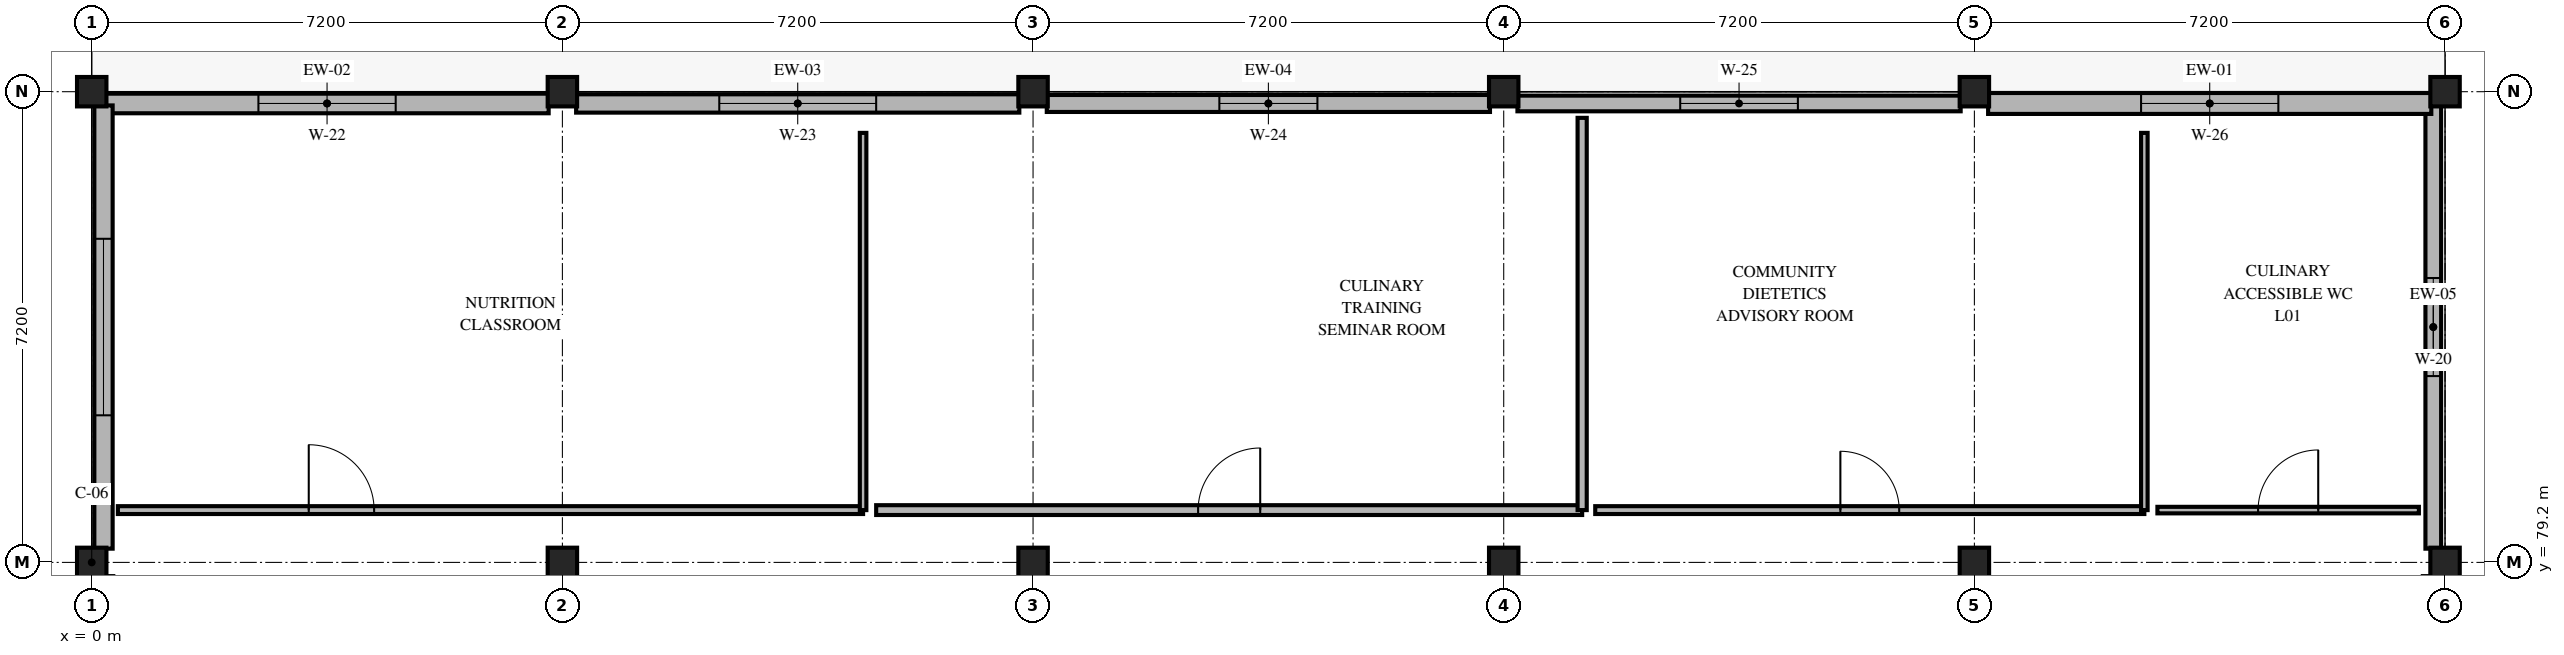
"""IFC4 building model, lengths in metres.
Left out: names, types, materials, properties, quantities, classifications, styles, units other than length and angle.
Written with IfcOpenShell. Run it as: python <this file> out.ifc"""

import sys

from ifc_helpers import new_model, si_unit, direction, frame, frame_2d, origin, origin_2d, place, context, subcontext, project, spatial, rectangle, extrude, element, fill, save


model = new_model("IFC4")
c1 = context("Model", 3, precision=1e-05, world=origin(), true_north=direction((0.0, 1.0)))
c2 = subcontext(c1, "Body", "Model", "MODEL_VIEW")
j1 = project(units=[si_unit("LENGTHUNIT", "METRE"), si_unit("PLANEANGLEUNIT", "RADIAN")], contexts=[c1])
p1 = place(None, origin())
s1 = spatial("IfcSite", under=j1, at=p1, CompositionType="ELEMENT")
p2 = place(p1, origin())
s2 = spatial("IfcBuilding", under=s1, at=p2, CompositionType="ELEMENT")
p3 = place(p2, frame((0.0, 0.0, 4.5)))
s3 = spatial("IfcBuildingStorey", under=s2, at=p3, CompositionType="ELEMENT", Elevation=4.5)
for number, where, z_axis, x_axis in (
    (1, (0.0, 79.2, 0.0), (0.0, 0.0, 1.0), (1.0, 0.0, 0.0)),
    (2, (0.0, 86.4, 0.0), (0.0, 0.0, 1.0), (1.0, 0.0, 0.0)),
    (3, (7.2, 79.2, 0.0), (0.0, 0.0, 1.0), (1.0, 0.0, 0.0)),
    (4, (7.2, 86.4, 0.0), (0.0, 0.0, 1.0), (1.0, 0.0, 0.0)),
    (5, (14.4, 79.2, 0.0), (0.0, 0.0, 1.0), (1.0, 0.0, 0.0)),
    (6, (14.4, 86.4, 0.0), (0.0, 0.0, 1.0), (1.0, 0.0, 0.0)),
    (7, (21.6, 79.2, 0.0), (0.0, 0.0, 1.0), (1.0, 0.0, 0.0)),
    (8, (21.6, 86.4, 0.0), (0.0, 0.0, 1.0), (1.0, 0.0, 0.0)),
    (9, (28.8, 79.2, 0.0), (0.0, 0.0, 1.0), (1.0, 0.0, 0.0)),
    (10, (28.8, 86.4, 0.0), (0.0, 0.0, 1.0), (1.0, 0.0, 0.0)),
    (11, (36.0, 79.2, 0.0), (0.0, 0.0, 1.0), (1.0, 0.0, 0.0)),
    (12, (36.0, 86.4, 0.0), (0.0, 0.0, 1.0), (1.0, 0.0, 0.0)),
):
    element("IfcColumn", number, at=place(p3, frame(where, z_axis=z_axis, x_axis=x_axis)), inside=s3, PredefinedType="COLUMN", context=c2, shape_type="SweptSolid", body=[
        extrude(rectangle(XDim=0.45, YDim=0.45, at=origin_2d()), origin(), (0.0, 0.0, 1.0), 4.2),
    ])
p4 = place(p3, frame((35.82, 86.19, 0.0), z_axis=(0.0, 0.0, 1.0), x_axis=(0.0, -1.0, 0.0)))
e13 = element("IfcWall", 13, at=p4, inside=s3, PredefinedType="SOLIDWALL", context=c2, shape_type="SweptSolid", body=[
    extrude(rectangle(XDim=6.78, YDim=0.24, at=frame_2d((3.39, 0.0))), origin(), (0.0, 0.0, 1.0), 3.15),
])
p5 = place(p4, frame((2.64, 0.0, 0.75)))
e14 = element("IfcOpeningElement", 14, at=p5, cuts=e13, PredefinedType="OPENING", context=c2, shape_type="SweptSolid", body=[
    extrude(rectangle(XDim=1.5, YDim=1.65, at=frame_2d((0.75, 0.825))), frame((0.0, 0.13, 0.0), z_axis=(0.0, -1.0, 0.0), x_axis=(1.0, 0.0, 0.0)), (0.0, 0.0, 1.0), 0.26),
])
p6 = place(p3, frame((0.21, 86.22, 0.0), z_axis=(0.0, 0.0, 1.0), x_axis=(1.0, 0.0, 0.0)))
e15 = element("IfcWall", 15, at=p6, inside=s3, PredefinedType="SOLIDWALL", context=c2, shape_type="SweptSolid", body=[
    extrude(rectangle(XDim=6.78, YDim=0.3, at=frame_2d((3.39, 0.0))), origin(), (0.0, 0.0, 1.0), 3.15),
])
p7 = place(p6, frame((2.34, 0.0, 0.75)))
e16 = element("IfcOpeningElement", 16, at=p7, cuts=e15, PredefinedType="OPENING", context=c2, shape_type="SweptSolid", body=[
    extrude(rectangle(XDim=2.1, YDim=1.65, at=frame_2d((1.05, 0.825))), frame((0.0, 0.16, 0.0), z_axis=(0.0, -1.0, 0.0), x_axis=(1.0, 0.0, 0.0)), (0.0, 0.0, 1.0), 0.32),
])
p8 = place(p3, frame((7.41, 86.22, 0.0), z_axis=(0.0, 0.0, 1.0), x_axis=(1.0, 0.0, 0.0)))
e17 = element("IfcWall", 17, at=p8, inside=s3, PredefinedType="SOLIDWALL", context=c2, shape_type="SweptSolid", body=[
    extrude(rectangle(XDim=6.78, YDim=0.28, at=frame_2d((3.39, 0.0))), origin(), (0.0, 0.0, 1.0), 3.15),
])
p9 = place(p8, frame((2.19, 0.0, 0.75)))
e18 = element("IfcOpeningElement", 18, at=p9, cuts=e17, PredefinedType="OPENING", context=c2, shape_type="SweptSolid", body=[
    extrude(rectangle(XDim=2.4, YDim=1.65, at=frame_2d((1.2, 0.825))), frame((0.0, 0.15, 0.0), z_axis=(0.0, -1.0, 0.0), x_axis=(1.0, 0.0, 0.0)), (0.0, 0.0, 1.0), 0.3),
])
p10 = place(p3, frame((14.61, 86.22, 0.0), z_axis=(0.0, 0.0, 1.0), x_axis=(1.0, 0.0, 0.0)))
e19 = element("IfcWall", 19, at=p10, inside=s3, PredefinedType="SOLIDWALL", context=c2, shape_type="SweptSolid", body=[
    extrude(rectangle(XDim=6.78, YDim=0.26, at=frame_2d((3.39, 0.0))), origin(), (0.0, 0.0, 1.0), 3.2),
])
p11 = place(p10, frame((2.64, 0.0, 0.9)))
e20 = element("IfcOpeningElement", 20, at=p11, cuts=e19, PredefinedType="OPENING", context=c2, shape_type="SweptSolid", body=[
    extrude(rectangle(XDim=1.5, YDim=0.75, at=frame_2d((0.75, 0.375))), frame((0.0, 0.14, 0.0), z_axis=(0.0, -1.0, 0.0), x_axis=(1.0, 0.0, 0.0)), (0.0, 0.0, 1.0), 0.28),
])
p12 = place(p3, frame((21.81, 86.22, 0.0), z_axis=(0.0, 0.0, 1.0), x_axis=(1.0, 0.0, 0.0)))
e21 = element("IfcWall", 21, at=p12, inside=s3, PredefinedType="SOLIDWALL", context=c2, shape_type="SweptSolid", body=[
    extrude(rectangle(XDim=6.78, YDim=0.24, at=frame_2d((3.39, 0.0))), origin(), (0.0, 0.0, 1.0), 3.2),
])
p13 = place(p12, frame((2.49, 0.0, 0.9)))
e22 = element("IfcOpeningElement", 22, at=p13, cuts=e21, PredefinedType="OPENING", context=c2, shape_type="SweptSolid", body=[
    extrude(rectangle(XDim=1.8, YDim=0.75, at=frame_2d((0.9, 0.375))), frame((0.0, 0.13, 0.0), z_axis=(0.0, -1.0, 0.0), x_axis=(1.0, 0.0, 0.0)), (0.0, 0.0, 1.0), 0.26),
])
p14 = place(p3, frame((29.01, 86.22, 0.0), z_axis=(0.0, 0.0, 1.0), x_axis=(1.0, 0.0, 0.0)))
e23 = element("IfcWall", 23, at=p14, inside=s3, PredefinedType="SOLIDWALL", context=c2, shape_type="SweptSolid", body=[
    extrude(rectangle(XDim=6.78, YDim=0.32, at=frame_2d((3.39, 0.0))), origin(), (0.0, 0.0, 1.0), 3.15),
])
p15 = place(p14, frame((2.34, 0.0, 0.9)))
e24 = element("IfcOpeningElement", 24, at=p15, cuts=e23, PredefinedType="OPENING", context=c2, shape_type="SweptSolid", body=[
    extrude(rectangle(XDim=2.1, YDim=0.75, at=frame_2d((1.05, 0.375))), frame((0.0, 0.17, 0.0), z_axis=(0.0, -1.0, 0.0), x_axis=(1.0, 0.0, 0.0)), (0.0, 0.0, 1.0), 0.34),
])
p16 = place(p3, frame((0.18, 79.41, 0.0), z_axis=(0.0, 0.0, 1.0), x_axis=(0.0, 1.0, 0.0)))
e25 = element("IfcWall", 25, at=p16, inside=s3, PredefinedType="SOLIDWALL", context=c2, shape_type="SweptSolid", body=[
    extrude(rectangle(XDim=6.78, YDim=0.28, at=frame_2d((3.39, 0.0))), origin(), (0.0, 0.0, 1.0), 3.15),
])
p17 = place(p16, frame((2.04, 0.0, 0.9)))
e26 = element("IfcOpeningElement", 26, at=p17, cuts=e25, PredefinedType="OPENING", context=c2, shape_type="SweptSolid", body=[
    extrude(rectangle(XDim=2.7, YDim=0.75, at=frame_2d((1.35, 0.375))), frame((0.0, 0.15, 0.0), z_axis=(0.0, -1.0, 0.0), x_axis=(1.0, 0.0, 0.0)), (0.0, 0.0, 1.0), 0.3),
])
p18 = place(p3, frame((0.4, 80.0, 0.0), z_axis=(0.0, 0.0, 1.0), x_axis=(1.0, 0.0, 0.0)))
e27 = element("IfcWall", 27, at=p18, inside=s3, PredefinedType="PARTITIONING", context=c2, shape_type="SweptSolid", body=[
    extrude(rectangle(XDim=11.4, YDim=0.12, at=frame_2d((5.7, 0.0))), origin(), (0.0, 0.0, 1.0), 3.25),
])
p19 = place(p18, frame((2.92, 0.0, 0.0)))
e28 = element("IfcOpeningElement", 28, at=p19, cuts=e27, PredefinedType="OPENING", context=c2, shape_type="SweptSolid", body=[
    extrude(rectangle(XDim=1.0, YDim=2.15, at=frame_2d((0.5, 1.075))), frame((0.0, 0.07, 0.0), z_axis=(0.0, -1.0, 0.0), x_axis=(1.0, 0.0, 0.0)), (0.0, 0.0, 1.0), 0.14),
])
p20 = place(p3, frame((11.8, 80.0, 0.0), z_axis=(0.0, 0.0, 1.0), x_axis=(0.0, 1.0, 0.0)))
e29 = element("IfcWall", 29, at=p20, inside=s3, PredefinedType="PARTITIONING", context=c2, shape_type="SweptSolid", body=[
    extrude(rectangle(XDim=5.77, YDim=0.1, at=frame_2d((2.885, 0.0))), origin(), (0.0, 0.0, 1.0), 3.39),
])
p21 = place(p3, frame((12.0, 80.0, 0.0), z_axis=(0.0, 0.0, 1.0), x_axis=(1.0, 0.0, 0.0)))
e30 = element("IfcWall", 30, at=p21, inside=s3, PredefinedType="PARTITIONING", context=c2, shape_type="SweptSolid", body=[
    extrude(rectangle(XDim=10.8, YDim=0.15, at=frame_2d((5.4, 0.0))), origin(), (0.0, 0.0, 1.0), 3.2),
])
p22 = place(p21, frame((4.925, 0.0, 0.0)))
e31 = element("IfcOpeningElement", 31, at=p22, cuts=e30, PredefinedType="OPENING", context=c2, shape_type="SweptSolid", body=[
    extrude(rectangle(XDim=0.95, YDim=2.15, at=frame_2d((0.475, 1.075))), frame((0.0, 0.085, 0.0), z_axis=(0.0, -1.0, 0.0), x_axis=(1.0, 0.0, 0.0)), (0.0, 0.0, 1.0), 0.17),
])
p23 = place(p3, frame((22.8, 80.0, 0.0), z_axis=(0.0, 0.0, 1.0), x_axis=(0.0, 1.0, 0.0)))
e32 = element("IfcWall", 32, at=p23, inside=s3, PredefinedType="PARTITIONING", context=c2, shape_type="SweptSolid", body=[
    extrude(rectangle(XDim=6.0, YDim=0.14, at=frame_2d((3.0, 0.0))), origin(), (0.0, 0.0, 1.0), 3.43),
])
p24 = place(p3, frame((23.0, 80.0, 0.0), z_axis=(0.0, 0.0, 1.0), x_axis=(1.0, 0.0, 0.0)))
e33 = element("IfcWall", 33, at=p24, inside=s3, PredefinedType="PARTITIONING", context=c2, shape_type="SweptSolid", body=[
    extrude(rectangle(XDim=8.4, YDim=0.12, at=frame_2d((4.2, 0.0))), origin(), (0.0, 0.0, 1.0), 3.3),
])
p25 = place(p24, frame((3.75, 0.0, 0.0)))
e34 = element("IfcOpeningElement", 34, at=p25, cuts=e33, PredefinedType="OPENING", context=c2, shape_type="SweptSolid", body=[
    extrude(rectangle(XDim=0.9, YDim=2.1, at=frame_2d((0.45, 1.05))), frame((0.0, 0.07, 0.0), z_axis=(0.0, -1.0, 0.0), x_axis=(1.0, 0.0, 0.0)), (0.0, 0.0, 1.0), 0.14),
])
p26 = place(p3, frame((31.4, 80.0, 0.0), z_axis=(0.0, 0.0, 1.0), x_axis=(0.0, 1.0, 0.0)))
e35 = element("IfcWall", 35, at=p26, inside=s3, PredefinedType="PARTITIONING", context=c2, shape_type="SweptSolid", body=[
    extrude(rectangle(XDim=5.77, YDim=0.1, at=frame_2d((2.885, 0.0))), origin(), (0.0, 0.0, 1.0), 3.33),
])
p27 = place(p3, frame((31.6, 80.0, 0.0), z_axis=(0.0, 0.0, 1.0), x_axis=(1.0, 0.0, 0.0)))
e36 = element("IfcWall", 36, at=p27, inside=s3, PredefinedType="PARTITIONING", context=c2, shape_type="SweptSolid", body=[
    extrude(rectangle(XDim=4.0, YDim=0.1, at=frame_2d((2.0, 0.0))), origin(), (0.0, 0.0, 1.0), 3.95),
])
p28 = place(p27, frame((1.54, 0.0, 0.0)))
e37 = element("IfcOpeningElement", 37, at=p28, cuts=e36, PredefinedType="OPENING", context=c2, shape_type="SweptSolid", body=[
    extrude(rectangle(XDim=0.92, YDim=2.1, at=frame_2d((0.46, 1.05))), frame((0.0, 0.06, 0.0), z_axis=(0.0, -1.0, 0.0), x_axis=(1.0, 0.0, 0.0)), (0.0, 0.0, 1.0), 0.12),
])
p29 = place(p5, origin())
e38 = element("IfcWindow", 38, at=p29, inside=s3, PartitioningType="SINGLE_PANEL", PredefinedType="WINDOW", context=c2, shape_type="SweptSolid", body=[
    extrude(rectangle(XDim=1.5, YDim=1.65, at=frame_2d((0.75, 0.825))), frame((0.0, 0.03, 0.0), z_axis=(0.0, -1.0, 0.0), x_axis=(1.0, 0.0, 0.0)), (0.0, 0.0, 1.0), 0.06),
])
fill(e14, e38)
p30 = place(p7, origin())
e39 = element("IfcWindow", 39, at=p30, inside=s3, PartitioningType="SINGLE_PANEL", PredefinedType="WINDOW", context=c2, shape_type="SweptSolid", body=[
    extrude(rectangle(XDim=2.1, YDim=1.65, at=frame_2d((1.05, 0.825))), frame((0.0, 0.03, 0.0), z_axis=(0.0, -1.0, 0.0), x_axis=(1.0, 0.0, 0.0)), (0.0, 0.0, 1.0), 0.06),
])
fill(e16, e39)
p31 = place(p9, origin())
e40 = element("IfcWindow", 40, at=p31, inside=s3, PartitioningType="SINGLE_PANEL", PredefinedType="WINDOW", context=c2, shape_type="SweptSolid", body=[
    extrude(rectangle(XDim=2.4, YDim=1.65, at=frame_2d((1.2, 0.825))), frame((0.0, 0.03, 0.0), z_axis=(0.0, -1.0, 0.0), x_axis=(1.0, 0.0, 0.0)), (0.0, 0.0, 1.0), 0.06),
])
fill(e18, e40)
p32 = place(p11, origin())
e41 = element("IfcWindow", 41, at=p32, inside=s3, PartitioningType="SINGLE_PANEL", PredefinedType="WINDOW", context=c2, shape_type="SweptSolid", body=[
    extrude(rectangle(XDim=1.5, YDim=0.75, at=frame_2d((0.75, 0.375))), frame((0.0, 0.03, 0.0), z_axis=(0.0, -1.0, 0.0), x_axis=(1.0, 0.0, 0.0)), (0.0, 0.0, 1.0), 0.06),
])
fill(e20, e41)
p33 = place(p13, origin())
e42 = element("IfcWindow", 42, at=p33, inside=s3, PartitioningType="SINGLE_PANEL", PredefinedType="WINDOW", context=c2, shape_type="SweptSolid", body=[
    extrude(rectangle(XDim=1.8, YDim=0.75, at=frame_2d((0.9, 0.375))), frame((0.0, 0.03, 0.0), z_axis=(0.0, -1.0, 0.0), x_axis=(1.0, 0.0, 0.0)), (0.0, 0.0, 1.0), 0.06),
])
fill(e22, e42)
p34 = place(p15, origin())
e43 = element("IfcWindow", 43, at=p34, inside=s3, PartitioningType="SINGLE_PANEL", PredefinedType="WINDOW", context=c2, shape_type="SweptSolid", body=[
    extrude(rectangle(XDim=2.1, YDim=0.75, at=frame_2d((1.05, 0.375))), frame((0.0, 0.03, 0.0), z_axis=(0.0, -1.0, 0.0), x_axis=(1.0, 0.0, 0.0)), (0.0, 0.0, 1.0), 0.06),
])
fill(e24, e43)
p35 = place(p17, origin())
e44 = element("IfcWindow", 44, at=p35, inside=s3, PartitioningType="SINGLE_PANEL", PredefinedType="WINDOW", context=c2, shape_type="SweptSolid", body=[
    extrude(rectangle(XDim=2.7, YDim=0.75, at=frame_2d((1.35, 0.375))), frame((0.0, 0.03, 0.0), z_axis=(0.0, -1.0, 0.0), x_axis=(1.0, 0.0, 0.0)), (0.0, 0.0, 1.0), 0.06),
])
fill(e26, e44)
p36 = place(p19, origin())
e45 = element("IfcDoor", 45, at=p36, inside=s3, OperationType="SINGLE_SWING_LEFT", PredefinedType="DOOR", context=c2, shape_type="SweptSolid", body=[
    extrude(rectangle(XDim=1.0, YDim=2.15, at=frame_2d((0.5, 1.075))), frame((0.0, 0.025, 0.0), z_axis=(0.0, -1.0, 0.0), x_axis=(1.0, 0.0, 0.0)), (0.0, 0.0, 1.0), 0.05),
])
fill(e28, e45)
p37 = place(p22, origin())
e46 = element("IfcDoor", 46, at=p37, inside=s3, OperationType="SINGLE_SWING_RIGHT", PredefinedType="DOOR", context=c2, shape_type="SweptSolid", body=[
    extrude(rectangle(XDim=0.95, YDim=2.15, at=frame_2d((0.475, 1.075))), frame((0.0, 0.025, 0.0), z_axis=(0.0, -1.0, 0.0), x_axis=(1.0, 0.0, 0.0)), (0.0, 0.0, 1.0), 0.05),
])
fill(e31, e46)
p38 = place(p25, origin())
e47 = element("IfcDoor", 47, at=p38, inside=s3, OperationType="SINGLE_SWING_LEFT", PredefinedType="DOOR", context=c2, shape_type="SweptSolid", body=[
    extrude(rectangle(XDim=0.9, YDim=2.1, at=frame_2d((0.45, 1.05))), frame((0.0, 0.025, 0.0), z_axis=(0.0, -1.0, 0.0), x_axis=(1.0, 0.0, 0.0)), (0.0, 0.0, 1.0), 0.05),
])
fill(e34, e47)
p39 = place(p28, origin())
e48 = element("IfcDoor", 48, at=p39, inside=s3, OperationType="SINGLE_SWING_RIGHT", PredefinedType="DOOR", context=c2, shape_type="SweptSolid", body=[
    extrude(rectangle(XDim=0.92, YDim=2.1, at=frame_2d((0.46, 1.05))), frame((0.0, 0.025, 0.0), z_axis=(0.0, -1.0, 0.0), x_axis=(1.0, 0.0, 0.0)), (0.0, 0.0, 1.0), 0.05),
])
fill(e37, e48)
save(model, sys.argv[1])
